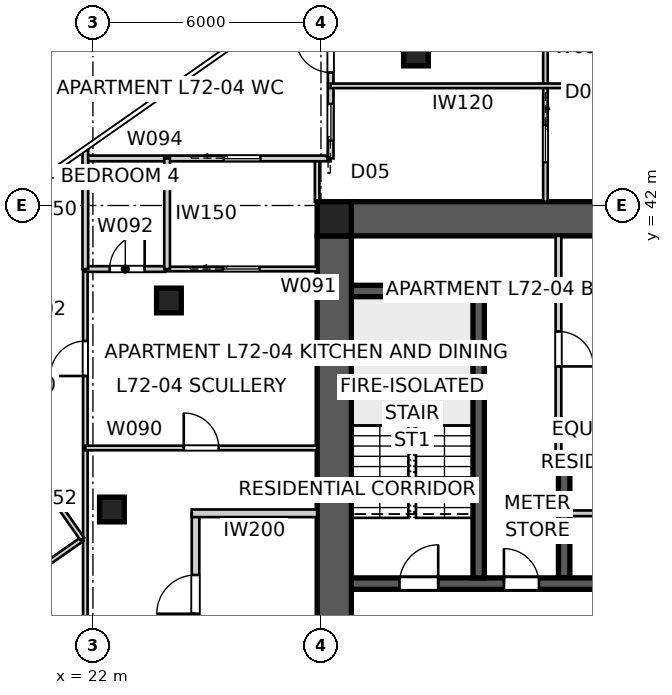
"""IFC4 building model, lengths in metres.
Left out: names, types, materials, properties, quantities, classifications, styles, units other than length and angle.
Written with IfcOpenShell. Run it as: python <this file> out.ifc"""

import sys

from ifc_helpers import new_model, si_unit, direction, frame, frame_2d, origin, origin_2d, place, context, subcontext, project, spatial, polyline, rectangle, outline, extrude, element, fill, save


model = new_model("IFC4")
c1 = context("Model", 3, precision=1e-05, world=origin(), true_north=direction((0.0, 1.0)))
c2 = subcontext(c1, "Body", "Model", "MODEL_VIEW")
j1 = project(units=[si_unit("LENGTHUNIT", "METRE"), si_unit("PLANEANGLEUNIT", "RADIAN")], contexts=[c1])
p1 = place(None, origin())
s1 = spatial("IfcSite", under=j1, at=p1, CompositionType="ELEMENT")
p2 = place(p1, origin())
s2 = spatial("IfcBuilding", under=s1, at=p2, CompositionType="ELEMENT")
p3 = place(p2, frame((0.0, 0.0, 260.8)))
s3 = spatial("IfcBuildingStorey", under=s2, at=p3, CompositionType="ELEMENT", Elevation=260.8)
p4 = place(p3, frame((28.8, 41.65, 0.0), z_axis=(0.0, 0.0, 1.0), x_axis=(1.0, 0.0, 0.0)))
e1 = element("IfcWall", 1, at=p4, inside=s3, PredefinedType="SHEAR", context=c2, shape_type="SweptSolid", body=[
    extrude(outline(polyline([(0.0, -0.45), (22.4, -0.45), (22.4, -0.025), (22.85, -0.025), (22.85, 0.025), (22.4, 0.025), (22.4, 0.45), (0.0, 0.45), (0.0, 0.025), (-0.45, 0.025), (-0.45, -0.025), (0.0, -0.025), (0.0, -0.45)])), origin(), (0.0, 0.0, 1.0), 3.4),
])
p5 = place(p3, frame((28.35, 41.2, 0.0), z_axis=(0.0, 0.0, 1.0), x_axis=(0.0, -1.0, 0.0)))
e2 = element("IfcWall", 2, at=p5, inside=s3, PredefinedType="SHEAR", context=c2, shape_type="SweptSolid", body=[
    extrude(outline(polyline([(0.0, -0.45), (22.4, -0.45), (22.4, -0.025), (22.85, -0.025), (22.85, 0.025), (22.4, 0.025), (22.4, 0.45), (0.0, 0.45), (0.0, 0.025), (-0.45, 0.025), (-0.45, -0.025), (0.0, -0.025), (0.0, -0.45)])), origin(), (0.0, 0.0, 1.0), 3.4),
])
p6 = place(p5, frame((11.14, 0.0, 0.0)))
e3 = element("IfcOpeningElement", 3, at=p6, cuts=e2, PredefinedType="OPENING", context=c2, shape_type="SweptSolid", body=[
    extrude(rectangle(XDim=1.02, YDim=2.4, at=frame_2d((0.51, 1.2))), frame((0.0, 0.46, 0.0), z_axis=(0.0, -1.0, 0.0), x_axis=(1.0, 0.0, 0.0)), (0.0, 0.0, 1.0), 0.92),
])
p7 = place(p3, frame((28.8, 32.05, 0.0), z_axis=(0.0, 0.0, 1.0), x_axis=(1.0, 0.0, 0.0)))
e4 = element("IfcWall", 4, at=p7, inside=s3, PredefinedType="SHEAR", context=c2, shape_type="SweptSolid", body=[
    extrude(rectangle(XDim=22.4, YDim=0.3, at=frame_2d((11.2, 0.0))), origin(), (0.0, 0.0, 1.0), 3.4),
])
p8 = place(p7, frame((19.04, 0.0, 0.0)))
e5 = element("IfcOpeningElement", 5, at=p8, cuts=e4, PredefinedType="OPENING", context=c2, shape_type="SweptSolid", body=[
    extrude(rectangle(XDim=0.92, YDim=2.1, at=frame_2d((0.46, 1.05))), frame((0.0, 0.16, 0.0), z_axis=(0.0, -1.0, 0.0), x_axis=(1.0, 0.0, 0.0)), (0.0, 0.0, 1.0), 0.32),
])
p9 = place(p7, frame((1.265, 0.0, 0.0)))
e6 = element("IfcOpeningElement", 6, at=p9, cuts=e4, PredefinedType="OPENING", context=c2, shape_type="SweptSolid", body=[
    extrude(rectangle(XDim=1.02, YDim=2.1, at=frame_2d((0.51, 1.05))), frame((0.0, 0.16, 0.0), z_axis=(0.0, -1.0, 0.0), x_axis=(1.0, 0.0, 0.0)), (0.0, 0.0, 1.0), 0.32),
])
p10 = place(p7, frame((4.015, 0.0, 0.0)))
e7 = element("IfcOpeningElement", 7, at=p10, cuts=e4, PredefinedType="OPENING", context=c2, shape_type="SweptSolid", body=[
    extrude(rectangle(XDim=0.92, YDim=2.1, at=frame_2d((0.46, 1.05))), frame((0.0, 0.16, 0.0), z_axis=(0.0, -1.0, 0.0), x_axis=(1.0, 0.0, 0.0)), (0.0, 0.0, 1.0), 0.32),
])
p11 = place(p7, frame((6.565, 0.0, 0.0)))
e8 = element("IfcOpeningElement", 8, at=p11, cuts=e4, PredefinedType="OPENING", context=c2, shape_type="SweptSolid", body=[
    extrude(rectangle(XDim=0.92, YDim=2.1, at=frame_2d((0.46, 1.05))), frame((0.0, 0.16, 0.0), z_axis=(0.0, -1.0, 0.0), x_axis=(1.0, 0.0, 0.0)), (0.0, 0.0, 1.0), 0.32),
])
p12 = place(p7, frame((8.89, 0.0, 0.0)))
e9 = element("IfcOpeningElement", 9, at=p12, cuts=e4, PredefinedType="OPENING", context=c2, shape_type="SweptSolid", body=[
    extrude(rectangle(XDim=0.92, YDim=2.1, at=frame_2d((0.46, 1.05))), frame((0.0, 0.16, 0.0), z_axis=(0.0, -1.0, 0.0), x_axis=(1.0, 0.0, 0.0)), (0.0, 0.0, 1.0), 0.32),
])
p13 = place(p7, frame((12.05, 0.0, 0.0)))
e10 = element("IfcOpeningElement", 10, at=p13, cuts=e4, PredefinedType="OPENING", context=c2, shape_type="SweptSolid", body=[
    extrude(rectangle(XDim=1.1, YDim=2.1, at=frame_2d((0.55, 1.05))), frame((0.0, 0.16, 0.0), z_axis=(0.0, -1.0, 0.0), x_axis=(1.0, 0.0, 0.0)), (0.0, 0.0, 1.0), 0.32),
])
p14 = place(p7, frame((14.85, 0.0, 0.0)))
e11 = element("IfcOpeningElement", 11, at=p14, cuts=e4, PredefinedType="OPENING", context=c2, shape_type="SweptSolid", body=[
    extrude(rectangle(XDim=1.1, YDim=2.1, at=frame_2d((0.55, 1.05))), frame((0.0, 0.16, 0.0), z_axis=(0.0, -1.0, 0.0), x_axis=(1.0, 0.0, 0.0)), (0.0, 0.0, 1.0), 0.32),
])
p15 = place(p3, frame((34.25, 35.15, 0.0), z_axis=(0.0, 0.0, 1.0), x_axis=(1.0, 0.0, 0.0)))
e12 = element("IfcWall", 12, at=p15, inside=s3, PredefinedType="SHEAR", context=c2, shape_type="SweptSolid", body=[
    extrude(rectangle(XDim=11.5, YDim=0.3, at=frame_2d((5.75, 0.0))), origin(), (0.0, 0.0, 1.0), 3.4),
])
p16 = place(p3, frame((34.4, 32.2, 0.0), z_axis=(0.0, 0.0, 1.0), x_axis=(0.0, 1.0, 0.0)))
e13 = element("IfcWall", 13, at=p16, inside=s3, PredefinedType="SHEAR", context=c2, shape_type="SweptSolid", body=[
    extrude(rectangle(XDim=2.8, YDim=0.3, at=frame_2d((1.4, 0.0))), origin(), (0.0, 0.0, 1.0), 3.4),
])
p17 = place(p3, frame((32.15, 32.2, 0.0), z_axis=(0.0, 0.0, 1.0), x_axis=(0.0, 1.0, 0.0)))
e14 = element("IfcWall", 14, at=p17, inside=s3, PredefinedType="SHEAR", context=c2, shape_type="SweptSolid", body=[
    extrude(rectangle(XDim=7.7, YDim=0.3, at=frame_2d((3.85, 0.0))), origin(), (0.0, 0.0, 1.0), 3.4),
])
p18 = place(p3, frame((28.8, 39.75, 0.0), z_axis=(0.0, 0.0, 1.0), x_axis=(1.0, 0.0, 0.0)))
e15 = element("IfcWall", 15, at=p18, inside=s3, PredefinedType="SHEAR", context=c2, shape_type="SweptSolid", body=[
    extrude(rectangle(XDim=3.5, YDim=0.3, at=frame_2d((1.75, 0.0))), origin(), (0.0, 0.0, 1.0), 3.4),
])
p19 = place(p3, frame((28.35, 41.65, 0.0), z_axis=(0.0, 0.0, 1.0), x_axis=(1.0, 0.0, 0.0)))
e16 = element("IfcColumn", 16, at=p19, inside=s3, PredefinedType="COLUMN", context=c2, shape_type="SweptSolid", body=[
    extrude(rectangle(XDim=0.9, YDim=0.9, at=origin_2d()), origin(), (0.0, 0.0, 1.0), 3.4),
])
for number, where, z_axis, x_axis in (
    (17, (30.5, 46.0, 0.0), (0.0, 0.0, 1.0), (1.0, 0.0, 0.0)),
    (18, (24.0, 39.5, 0.0), (0.0, 0.0, 1.0), (1.0, 0.0, 0.0)),
    (19, (22.5, 34.0, 0.0), (0.0, 0.0, 1.0), (1.0, 0.0, 0.0)),
):
    element("IfcColumn", number, at=place(p3, frame(where, z_axis=z_axis, x_axis=x_axis)), inside=s3, PredefinedType="COLUMN", context=c2, shape_type="SweptSolid", body=[
        extrude(rectangle(XDim=0.65, YDim=0.65, at=origin_2d()), origin(), (0.0, 0.0, 1.0), 3.4),
    ])
p20 = place(p3, frame((24.7, 26.1, 0.0), z_axis=(0.0, 0.0, 1.0), x_axis=(0.0, 1.0, 0.0)))
e20 = element("IfcWall", 20, at=p20, inside=s3, PredefinedType="PARTITIONING", context=c2, shape_type="SweptSolid", body=[
    extrude(rectangle(XDim=7.8, YDim=0.2, at=frame_2d((3.9, 0.0))), origin(), (0.0, 0.0, 1.0), 3.25),
])
p21 = place(p20, frame((1.662, 0.0, 0.0)))
e21 = element("IfcOpeningElement", 21, at=p21, cuts=e20, PredefinedType="OPENING", context=c2, shape_type="SweptSolid", body=[
    extrude(rectangle(XDim=1.02, YDim=2.34, at=frame_2d((0.51, 1.17))), frame((0.0, 0.11, 0.0), z_axis=(0.0, -1.0, 0.0), x_axis=(1.0, 0.0, 0.0)), (0.0, 0.0, 1.0), 0.22),
])
p22 = place(p20, frame((5.157, 0.0, 0.0)))
e22 = element("IfcOpeningElement", 22, at=p22, cuts=e20, PredefinedType="OPENING", context=c2, shape_type="SweptSolid", body=[
    extrude(rectangle(XDim=1.02, YDim=2.34, at=frame_2d((0.51, 1.17))), frame((0.0, 0.11, 0.0), z_axis=(0.0, -1.0, 0.0), x_axis=(1.0, 0.0, 0.0)), (0.0, 0.0, 1.0), 0.22),
])
p23 = place(p3, frame((27.9, 33.9, 0.0), z_axis=(0.0, 0.0, 1.0), x_axis=(-1.0, 0.0, 0.0)))
e23 = element("IfcWall", 23, at=p23, inside=s3, PredefinedType="PARTITIONING", context=c2, shape_type="SweptSolid", body=[
    extrude(rectangle(XDim=3.3, YDim=0.2, at=frame_2d((1.65, 0.0))), origin(), (0.0, 0.0, 1.0), 3.25),
])
p24 = place(p3, frame((34.25, 41.2, 0.0), z_axis=(0.0, 0.0, 1.0), x_axis=(0.0, -1.0, 0.0)))
e24 = element("IfcWall", 24, at=p24, inside=s3, PredefinedType="SOLIDWALL", context=c2, shape_type="SweptSolid", body=[
    extrude(rectangle(XDim=5.95, YDim=0.15, at=frame_2d((2.975, 0.0))), origin(), (0.0, 0.0, 1.0), 3.25),
])
p25 = place(p24, frame((2.515, 0.0, 0.0)))
e25 = element("IfcOpeningElement", 25, at=p25, cuts=e24, PredefinedType="OPENING", context=c2, shape_type="SweptSolid", body=[
    extrude(rectangle(XDim=0.92, YDim=2.1, at=frame_2d((0.46, 1.05))), frame((0.0, 0.085, 0.0), z_axis=(0.0, -1.0, 0.0), x_axis=(1.0, 0.0, 0.0)), (0.0, 0.0, 1.0), 0.17),
])
p26 = place(p3, frame((21.8, 18.578, 0.0), z_axis=(0.0, 0.0, 1.0), x_axis=(0.0, 1.0, 0.0)))
e26 = element("IfcWall", 26, at=p26, inside=s3, PredefinedType="PARTITIONING", context=c2, shape_type="SweptSolid", body=[
    extrude(rectangle(XDim=21.75, YDim=0.12, at=frame_2d((10.875, 0.0))), origin(), (0.0, 0.0, 1.0), 3.25),
])
p27 = place(p26, frame((11.53, 0.0, 0.0)))
e27 = element("IfcOpeningElement", 27, at=p27, cuts=e26, PredefinedType="OPENING", context=c2, shape_type="SweptSolid", body=[
    extrude(rectangle(XDim=0.92, YDim=2.34, at=frame_2d((0.46, 1.17))), frame((0.0, 0.07, 0.0), z_axis=(0.0, -1.0, 0.0), x_axis=(1.0, 0.0, 0.0)), (0.0, 0.0, 1.0), 0.14),
])
p28 = place(p26, frame((5.585, 0.0, 0.0)))
e28 = element("IfcOpeningElement", 28, at=p28, cuts=e26, PredefinedType="OPENING", context=c2, shape_type="SweptSolid", body=[
    extrude(rectangle(XDim=0.96, YDim=2.1, at=frame_2d((0.48, 1.05))), frame((0.0, 0.07, 0.0), z_axis=(0.0, -1.0, 0.0), x_axis=(1.0, 0.0, 0.0)), (0.0, 0.0, 1.0), 0.14),
])
p29 = place(p26, frame((18.936, 0.0, 0.0)))
e29 = element("IfcOpeningElement", 29, at=p29, cuts=e26, PredefinedType="OPENING", context=c2, shape_type="SweptSolid", body=[
    extrude(rectangle(XDim=0.92, YDim=2.34, at=frame_2d((0.46, 1.17))), frame((0.0, 0.07, 0.0), z_axis=(0.0, -1.0, 0.0), x_axis=(1.0, 0.0, 0.0)), (0.0, 0.0, 1.0), 0.14),
])
p30 = place(p3, frame((21.8, 35.619, 0.0), z_axis=(0.0, 0.0, 1.0), x_axis=(1.0, 0.0, 0.0)))
e30 = element("IfcWall", 30, at=p30, inside=s3, PredefinedType="PARTITIONING", context=c2, shape_type="SweptSolid", body=[
    extrude(rectangle(XDim=6.1, YDim=0.12, at=frame_2d((3.05, 0.0))), origin(), (0.0, 0.0, 1.0), 3.25),
])
p31 = place(p30, frame((2.59, 0.0, 0.0)))
e31 = element("IfcOpeningElement", 31, at=p31, cuts=e30, PredefinedType="OPENING", context=c2, shape_type="SweptSolid", body=[
    extrude(rectangle(XDim=0.92, YDim=2.34, at=frame_2d((0.46, 1.17))), frame((0.0, 0.07, 0.0), z_axis=(0.0, -1.0, 0.0), x_axis=(1.0, 0.0, 0.0)), (0.0, 0.0, 1.0), 0.14),
])
p32 = place(p3, frame((23.902, 40.328, 0.0), z_axis=(0.0, 0.0, 1.0), x_axis=(1.0, 0.0, 0.0)))
e32 = element("IfcWall", 32, at=p32, inside=s3, PredefinedType="PARTITIONING", context=c2, shape_type="SweptSolid", body=[
    extrude(rectangle(XDim=3.998, YDim=0.12, at=frame_2d((1.999, 0.0))), origin(), (0.0, 0.0, 1.0), 3.25),
])
p33 = place(p32, frame((1.519, 0.0, 0.0)))
e33 = element("IfcOpeningElement", 33, at=p33, cuts=e32, PredefinedType="OPENING", context=c2, shape_type="SweptSolid", body=[
    extrude(rectangle(XDim=0.96, YDim=2.1, at=frame_2d((0.48, 1.05))), frame((0.0, 0.07, 0.0), z_axis=(0.0, -1.0, 0.0), x_axis=(1.0, 0.0, 0.0)), (0.0, 0.0, 1.0), 0.14),
])
p34 = place(p3, frame((21.8, 40.328, 0.0), z_axis=(0.0, 0.0, 1.0), x_axis=(1.0, 0.0, 0.0)))
e34 = element("IfcWall", 34, at=p34, inside=s3, PredefinedType="SOLIDWALL", context=c2, shape_type="SweptSolid", body=[
    extrude(rectangle(XDim=2.102, YDim=0.15, at=frame_2d((1.051, 0.0))), origin(), (0.0, 0.0, 1.0), 3.25),
])
p35 = place(p34, frame((0.641, 0.0, 0.0)))
e35 = element("IfcOpeningElement", 35, at=p35, cuts=e34, PredefinedType="OPENING", context=c2, shape_type="SweptSolid", body=[
    extrude(rectangle(XDim=0.92, YDim=2.34, at=frame_2d((0.46, 1.17))), frame((0.0, 0.085, 0.0), z_axis=(0.0, -1.0, 0.0), x_axis=(1.0, 0.0, 0.0)), (0.0, 0.0, 1.0), 0.17),
])
p36 = place(p3, frame((27.9, 42.1, 0.0), z_axis=(0.0, 0.0, 1.0), x_axis=(0.0, 1.0, 0.0)))
e36 = element("IfcWall", 36, at=p36, inside=s3, PredefinedType="PARTITIONING", context=c2, shape_type="SweptSolid", body=[
    extrude(rectangle(XDim=1.138, YDim=0.12, at=frame_2d((0.569, 0.0))), origin(), (0.0, 0.0, 1.0), 3.25),
])
p37 = place(p3, frame((21.8, 43.238, 0.0), z_axis=(0.0, 0.0, 1.0), x_axis=(1.0, 0.0, 0.0)))
e37 = element("IfcWall", 37, at=p37, inside=s3, PredefinedType="SOLIDWALL", context=c2, shape_type="SweptSolid", body=[
    extrude(rectangle(XDim=6.455, YDim=0.15, at=frame_2d((3.228, 0.0))), origin(), (0.0, 0.0, 1.0), 3.25),
])
p38 = place(p37, frame((3.646, 0.0, 0.0)))
e38 = element("IfcOpeningElement", 38, at=p38, cuts=e37, PredefinedType="OPENING", context=c2, shape_type="SweptSolid", body=[
    extrude(rectangle(XDim=0.96, YDim=2.1, at=frame_2d((0.48, 1.05))), frame((0.0, 0.085, 0.0), z_axis=(0.0, -1.0, 0.0), x_axis=(1.0, 0.0, 0.0)), (0.0, 0.0, 1.0), 0.17),
])
p39 = place(p3, frame((28.255, 43.238, 0.0), z_axis=(0.0, 0.0, 1.0), x_axis=(0.0, 1.0, 0.0)))
e39 = element("IfcWall", 39, at=p39, inside=s3, PredefinedType="SOLIDWALL", context=c2, shape_type="SweptSolid", body=[
    extrude(rectangle(XDim=4.736, YDim=0.15, at=frame_2d((2.368, 0.0))), origin(), (0.0, 0.0, 1.0), 3.25),
])
p40 = place(p39, frame((2.262, 0.0, 0.0)))
e40 = element("IfcOpeningElement", 40, at=p40, cuts=e39, PredefinedType="OPENING", context=c2, shape_type="SweptSolid", body=[
    extrude(rectangle(XDim=0.92, YDim=2.34, at=frame_2d((0.46, 1.17))), frame((0.0, 0.085, 0.0), z_axis=(0.0, -1.0, 0.0), x_axis=(1.0, 0.0, 0.0)), (0.0, 0.0, 1.0), 0.17),
])
p41 = place(p39, frame((0.475, 0.0, 0.0)))
e41 = element("IfcOpeningElement", 41, at=p41, cuts=e39, PredefinedType="OPENING", context=c2, shape_type="SweptSolid", body=[
    extrude(rectangle(XDim=0.96, YDim=2.1, at=frame_2d((0.48, 1.05))), frame((0.0, 0.085, 0.0), z_axis=(0.0, -1.0, 0.0), x_axis=(1.0, 0.0, 0.0)), (0.0, 0.0, 1.0), 0.17),
])
p42 = place(p3, frame((33.907, 48.2, 0.0), z_axis=(0.0, 0.0, 1.0), x_axis=(0.0, -1.0, 0.0)))
e42 = element("IfcWall", 42, at=p42, inside=s3, PredefinedType="PARTITIONING", context=c2, shape_type="SweptSolid", body=[
    extrude(rectangle(XDim=6.1, YDim=0.12, at=frame_2d((3.05, 0.0))), origin(), (0.0, 0.0, 1.0), 3.25),
])
p43 = place(p42, frame((4.096, 0.0, 0.0)))
e43 = element("IfcOpeningElement", 43, at=p43, cuts=e42, PredefinedType="OPENING", context=c2, shape_type="SweptSolid", body=[
    extrude(rectangle(XDim=0.96, YDim=2.1, at=frame_2d((0.48, 1.05))), frame((0.0, 0.07, 0.0), z_axis=(0.0, -1.0, 0.0), x_axis=(1.0, 0.0, 0.0)), (0.0, 0.0, 1.0), 0.14),
])
p44 = place(p3, frame((28.255, 45.148, 0.0), z_axis=(0.0, 0.0, 1.0), x_axis=(0.99999998913, 0.000147442917, 0.0)))
e44 = element("IfcWall", 44, at=p44, inside=s3, PredefinedType="PARTITIONING", context=c2, shape_type="SweptSolid", body=[
    extrude(rectangle(XDim=11.591, YDim=0.12, at=frame_2d((5.795, 0.0))), origin(), (0.0, 0.0, 1.0), 3.25),
])
p45 = place(p3, frame((23.952, 40.328, 0.0), z_axis=(0.0, 0.0, 1.0), x_axis=(0.0, 1.0, 0.0)))
e45 = element("IfcWall", 45, at=p45, inside=s3, PredefinedType="SOLIDWALL", context=c2, shape_type="SweptSolid", body=[
    extrude(rectangle(XDim=2.91, YDim=0.15, at=frame_2d((1.455, 0.0))), origin(), (0.0, 0.0, 1.0), 3.25),
])
p46 = place(p3, frame((21.8, 40.328, 0.0), z_axis=(0.0, 0.0, 1.0), x_axis=(0.0, 1.0, 0.0)))
e46 = element("IfcWall", 46, at=p46, inside=s3, PredefinedType="SOLIDWALL", context=c2, shape_type="SweptSolid", body=[
    extrude(rectangle(XDim=3.126, YDim=0.15, at=frame_2d((1.563, 0.0))), origin(), (0.0, 0.0, 1.0), 3.25),
])
p47 = place(p3, frame((21.72, 33.223, 0.0), z_axis=(0.0, 0.0, 1.0), x_axis=(-0.819152099525, -0.573576357466, 0.0)))
e47 = element("IfcWall", 47, at=p47, inside=s3, PredefinedType="PARTITIONING", context=c2, shape_type="SweptSolid", body=[
    extrude(rectangle(XDim=8.335, YDim=0.12, at=frame_2d((4.167, 0.0))), origin(), (0.0, 0.0, 1.0), 3.25),
])
p48 = place(p47, frame((1.728, 0.0, 0.0)))
e48 = element("IfcOpeningElement", 48, at=p48, cuts=e47, PredefinedType="OPENING", context=c2, shape_type="SweptSolid", body=[
    extrude(rectangle(XDim=0.92, YDim=2.34, at=frame_2d((0.46, 1.17))), frame((0.0, 0.07, 0.0), z_axis=(0.0, -1.0, 0.0), x_axis=(1.0, 0.0, 0.0)), (0.0, 0.0, 1.0), 0.14),
])
p49 = place(p47, frame((5.89, 0.0, 0.0)))
e49 = element("IfcOpeningElement", 49, at=p49, cuts=e47, PredefinedType="OPENING", context=c2, shape_type="SweptSolid", body=[
    extrude(rectangle(XDim=0.92, YDim=2.34, at=frame_2d((0.46, 1.17))), frame((0.0, 0.07, 0.0), z_axis=(0.0, -1.0, 0.0), x_axis=(1.0, 0.0, 0.0)), (0.0, 0.0, 1.0), 0.14),
])
p50 = place(p3, frame((16.94, 40.051, 0.0), z_axis=(0.0, 0.0, 1.0), x_axis=(0.573576357466, -0.819152099525, 0.0)))
e50 = element("IfcWall", 50, at=p50, inside=s3, PredefinedType="PARTITIONING", context=c2, shape_type="SweptSolid", body=[
    extrude(rectangle(XDim=8.335, YDim=0.12, at=frame_2d((4.167, 0.0))), origin(), (0.0, 0.0, 1.0), 3.25),
])
p51 = place(p3, frame((34.55, 33.9, 0.0), z_axis=(0.0, 0.0, 1.0), x_axis=(1.0, 0.0, 0.0)))
e51 = element("IfcWall", 51, at=p51, inside=s3, PredefinedType="SOLIDWALL", context=c2, shape_type="SweptSolid", body=[
    extrude(rectangle(XDim=5.35, YDim=0.15, at=frame_2d((2.675, 0.0))), origin(), (0.0, 0.0, 1.0), 3.25),
])
p52 = place(p51, frame((2.215, 0.0, 0.0)))
e52 = element("IfcOpeningElement", 52, at=p52, cuts=e51, PredefinedType="OPENING", context=c2, shape_type="SweptSolid", body=[
    extrude(rectangle(XDim=0.92, YDim=2.1, at=frame_2d((0.46, 1.05))), frame((0.0, 0.085, 0.0), z_axis=(0.0, -1.0, 0.0), x_axis=(1.0, 0.0, 0.0)), (0.0, 0.0, 1.0), 0.17),
])
p53 = place(p9, origin())
e53 = element("IfcDoor", 53, at=p53, inside=s3, OperationType="SINGLE_SWING_RIGHT", PredefinedType="DOOR", context=c2, shape_type="SweptSolid", body=[
    extrude(rectangle(XDim=1.02, YDim=2.1, at=frame_2d((0.51, 1.05))), frame((0.0, 0.025, 0.0), z_axis=(0.0, -1.0, 0.0), x_axis=(1.0, 0.0, 0.0)), (0.0, 0.0, 1.0), 0.05),
])
fill(e6, e53)
p54 = place(p10, origin())
e54 = element("IfcDoor", 54, at=p54, inside=s3, OperationType="SINGLE_SWING_LEFT", PredefinedType="DOOR", context=c2, shape_type="SweptSolid", body=[
    extrude(rectangle(XDim=0.92, YDim=2.1, at=frame_2d((0.46, 1.05))), frame((0.0, 0.025, 0.0), z_axis=(0.0, -1.0, 0.0), x_axis=(1.0, 0.0, 0.0)), (0.0, 0.0, 1.0), 0.05),
])
fill(e7, e54)
p55 = place(p22, origin())
e55 = element("IfcDoor", 55, at=p55, inside=s3, OperationType="SINGLE_SWING_LEFT", PredefinedType="DOOR", context=c2, shape_type="SweptSolid", body=[
    extrude(rectangle(XDim=1.02, YDim=2.34, at=frame_2d((0.51, 1.17))), frame((0.0, 0.025, 0.0), z_axis=(0.0, -1.0, 0.0), x_axis=(1.0, 0.0, 0.0)), (0.0, 0.0, 1.0), 0.05),
])
fill(e22, e55)
p56 = place(p25, origin())
e56 = element("IfcDoor", 56, at=p56, inside=s3, OperationType="SINGLE_SWING_RIGHT", PredefinedType="DOOR", context=c2, shape_type="SweptSolid", body=[
    extrude(rectangle(XDim=0.92, YDim=2.1, at=frame_2d((0.46, 1.05))), frame((0.0, 0.025, 0.0), z_axis=(0.0, -1.0, 0.0), x_axis=(1.0, 0.0, 0.0)), (0.0, 0.0, 1.0), 0.05),
])
fill(e25, e56)
p57 = place(p31, origin())
e57 = element("IfcDoor", 57, at=p57, inside=s3, OperationType="SINGLE_SWING_LEFT", PredefinedType="DOOR", context=c2, shape_type="SweptSolid", body=[
    extrude(rectangle(XDim=0.92, YDim=2.34, at=frame_2d((0.46, 1.17))), frame((0.0, 0.025, 0.0), z_axis=(0.0, -1.0, 0.0), x_axis=(1.0, 0.0, 0.0)), (0.0, 0.0, 1.0), 0.05),
])
fill(e31, e57)
p58 = place(p29, origin())
e58 = element("IfcDoor", 58, at=p58, inside=s3, OperationType="SINGLE_SWING_LEFT", PredefinedType="DOOR", context=c2, shape_type="SweptSolid", body=[
    extrude(rectangle(XDim=0.92, YDim=2.34, at=frame_2d((0.46, 1.17))), frame((0.0, 0.025, 0.0), z_axis=(0.0, -1.0, 0.0), x_axis=(1.0, 0.0, 0.0)), (0.0, 0.0, 1.0), 0.05),
])
fill(e29, e58)
p59 = place(p33, origin())
e59 = element("IfcDoor", 59, at=p59, inside=s3, OperationType="SLIDING_TO_LEFT", PredefinedType="DOOR", context=c2, shape_type="SweptSolid", body=[
    extrude(rectangle(XDim=0.96, YDim=2.1, at=frame_2d((0.48, 1.05))), frame((0.0, 0.025, 0.0), z_axis=(0.0, -1.0, 0.0), x_axis=(1.0, 0.0, 0.0)), (0.0, 0.0, 1.0), 0.05),
])
fill(e33, e59)
p60 = place(p35, origin())
e60 = element("IfcDoor", 60, at=p60, inside=s3, OperationType="SINGLE_SWING_RIGHT", PredefinedType="DOOR", context=c2, shape_type="SweptSolid", body=[
    extrude(rectangle(XDim=0.92, YDim=2.34, at=frame_2d((0.46, 1.17))), frame((0.0, 0.025, 0.0), z_axis=(0.0, -1.0, 0.0), x_axis=(1.0, 0.0, 0.0)), (0.0, 0.0, 1.0), 0.05),
])
fill(e35, e60)
p61 = place(p38, origin())
e61 = element("IfcDoor", 61, at=p61, inside=s3, OperationType="SLIDING_TO_LEFT", PredefinedType="DOOR", context=c2, shape_type="SweptSolid", body=[
    extrude(rectangle(XDim=0.96, YDim=2.1, at=frame_2d((0.48, 1.05))), frame((0.0, 0.025, 0.0), z_axis=(0.0, -1.0, 0.0), x_axis=(1.0, 0.0, 0.0)), (0.0, 0.0, 1.0), 0.05),
])
fill(e38, e61)
p62 = place(p40, origin())
e62 = element("IfcDoor", 62, at=p62, inside=s3, OperationType="SINGLE_SWING_RIGHT", PredefinedType="DOOR", context=c2, shape_type="SweptSolid", body=[
    extrude(rectangle(XDim=0.92, YDim=2.34, at=frame_2d((0.46, 1.17))), frame((0.0, 0.025, 0.0), z_axis=(0.0, -1.0, 0.0), x_axis=(1.0, 0.0, 0.0)), (0.0, 0.0, 1.0), 0.05),
])
fill(e40, e62)
p63 = place(p41, origin())
e63 = element("IfcDoor", 63, at=p63, inside=s3, OperationType="SLIDING_TO_LEFT", PredefinedType="DOOR", context=c2, shape_type="SweptSolid", body=[
    extrude(rectangle(XDim=0.96, YDim=2.1, at=frame_2d((0.48, 1.05))), frame((0.0, 0.025, 0.0), z_axis=(0.0, -1.0, 0.0), x_axis=(1.0, 0.0, 0.0)), (0.0, 0.0, 1.0), 0.05),
])
fill(e41, e63)
p64 = place(p43, origin())
e64 = element("IfcDoor", 64, at=p64, inside=s3, OperationType="SLIDING_TO_LEFT", PredefinedType="DOOR", context=c2, shape_type="SweptSolid", body=[
    extrude(rectangle(XDim=0.96, YDim=2.1, at=frame_2d((0.48, 1.05))), frame((0.0, 0.025, 0.0), z_axis=(0.0, -1.0, 0.0), x_axis=(1.0, 0.0, 0.0)), (0.0, 0.0, 1.0), 0.05),
])
fill(e43, e64)
save(model, sys.argv[1])
